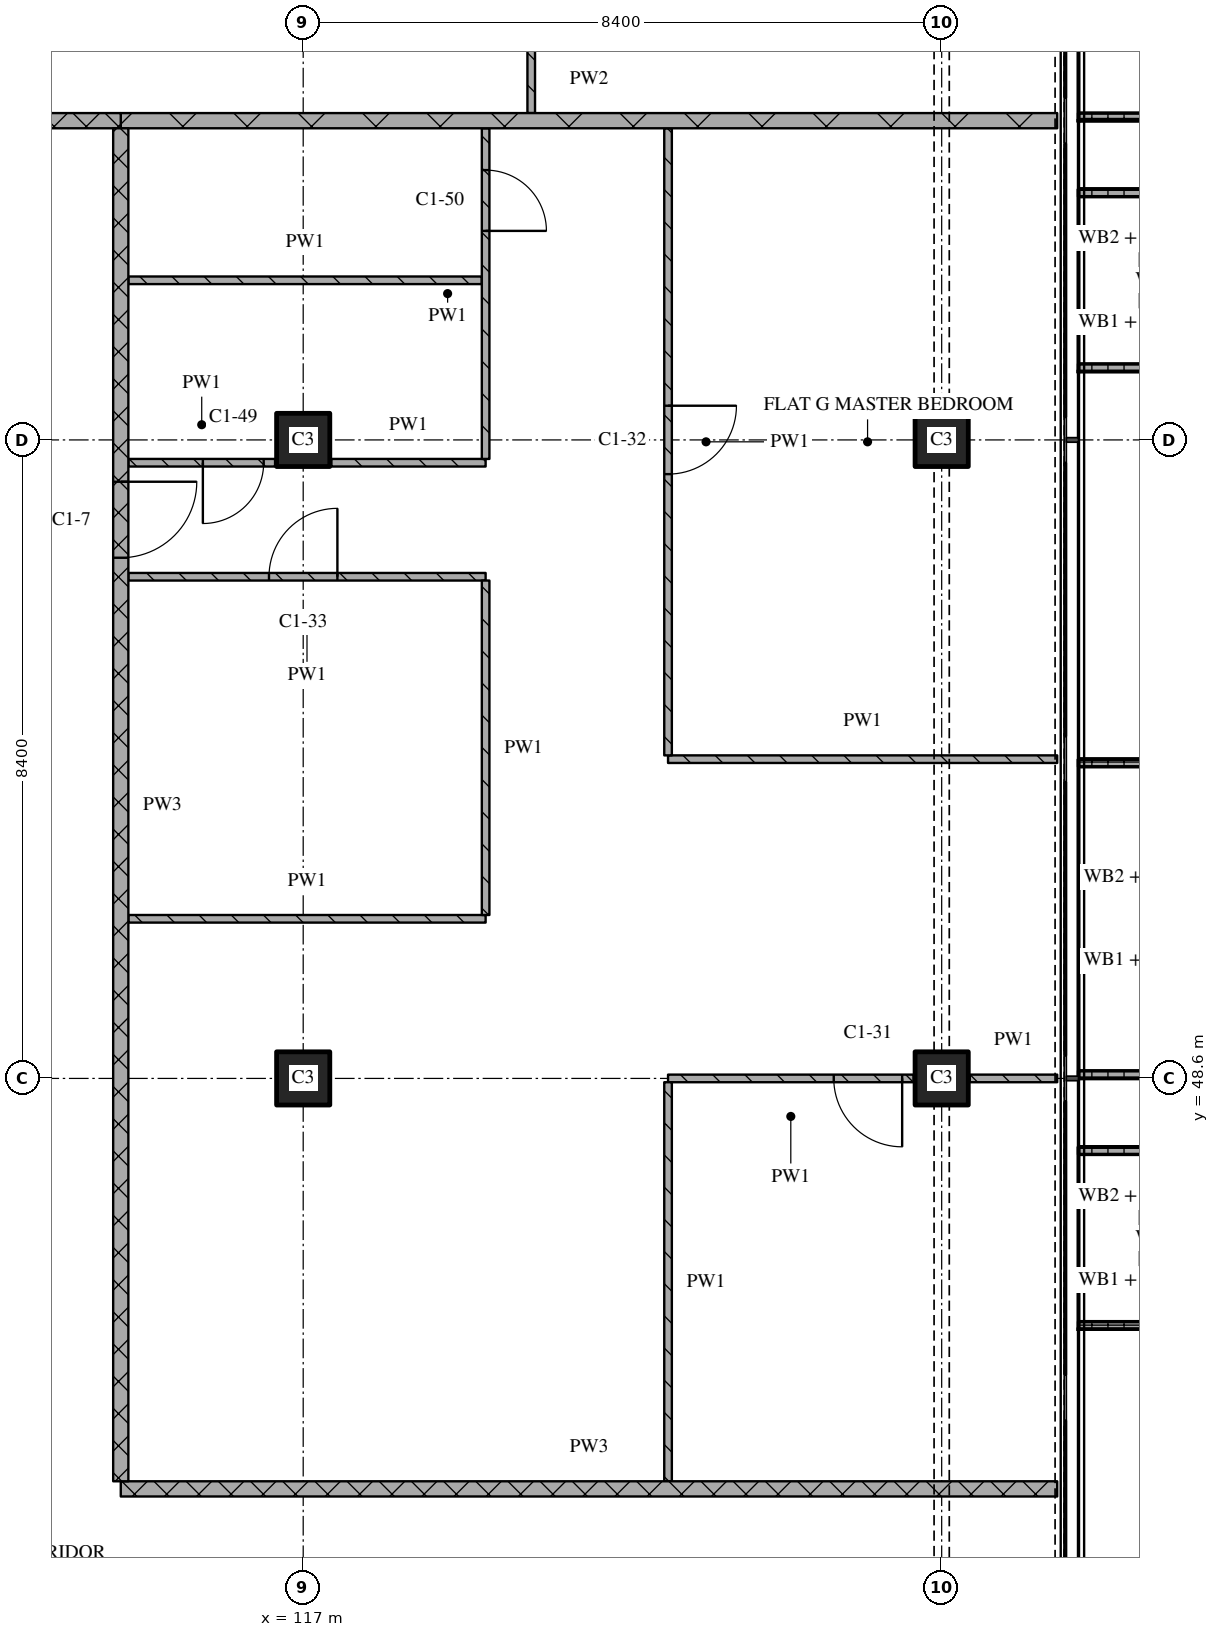
"""IFC4 building model, lengths in metres.
Left out: names, types, materials, properties, quantities, classifications, styles, units other than length and angle.
Written with IfcOpenShell. Run it as: python <this file> out.ifc"""

import sys

from ifc_helpers import new_model, si_unit, direction, frame, frame_2d, origin, origin_2d, place, context, subcontext, project, spatial, polyline, rectangle, outline, extrude, element, fill, save


model = new_model("IFC4")
c1 = context("Model", 3, precision=1e-05, world=origin(), true_north=direction((0.0, 1.0)))
c2 = subcontext(c1, "Body", "Model", "MODEL_VIEW")
j1 = project(units=[si_unit("LENGTHUNIT", "METRE"), si_unit("PLANEANGLEUNIT", "RADIAN")], contexts=[c1])
p1 = place(None, origin())
s1 = spatial("IfcSite", under=j1, at=p1, CompositionType="ELEMENT")
p2 = place(p1, origin())
s2 = spatial("IfcBuilding", under=s1, at=p2, CompositionType="ELEMENT")
p3 = place(p2, frame((0.0, 0.0, 154.65)))
s3 = spatial("IfcBuildingStorey", under=s2, at=p3, CompositionType="ELEMENT", Elevation=154.65)
for number, where, z_axis, x_axis in (
    (1, (117.0, 48.6, 0.0), (0.0, 0.0, 1.0), (1.0, 0.0, 0.0)),
    (2, (117.0, 57.0, 0.0), (0.0, 0.0, 1.0), (1.0, 0.0, 0.0)),
    (3, (125.4, 48.6, 0.0), (0.0, 0.0, 1.0), (1.0, 0.0, 0.0)),
    (4, (125.4, 57.0, 0.0), (0.0, 0.0, 1.0), (1.0, 0.0, 0.0)),
):
    element("IfcColumn", number, at=place(p3, frame(where, z_axis=z_axis, x_axis=x_axis)), inside=s3, PredefinedType="COLUMN", context=c2, shape_type="SweptSolid", body=[
        extrude(rectangle(XDim=0.7, YDim=0.7, at=origin_2d()), origin(), (0.0, 0.0, 1.0), 3.6),
    ])
p4 = place(p3, origin())
e5 = element("IfcWall", 5, at=p4, inside=s3, PredefinedType="SOLIDWALL", context=c2, shape_type="SweptSolid", body=[
    extrude(outline(polyline([(127.2, 45.3), (127.2, 45.4), (128.7, 45.4), (128.7, 47.6), (127.2, 47.6), (127.2, 47.7), (128.8, 47.7), (128.8, 45.3), (127.2, 45.3)])), origin(), (0.0, 0.0, 1.0), 1.0),
])
p5 = place(p3, origin())
e6 = element("IfcWall", 6, at=p5, inside=s3, PredefinedType="SOLIDWALL", context=c2, shape_type="SweptSolid", body=[
    extrude(outline(polyline([(127.2, 48.6), (127.2, 48.7), (128.833, 48.7), (128.833, 52.7), (127.2, 52.7), (127.2, 52.8), (128.933, 52.8), (128.933, 48.6), (127.2, 48.6)])), origin(), (0.0, 0.0, 1.0), 1.0),
])
p6 = place(p3, origin())
e7 = element("IfcWall", 7, at=p6, inside=s3, PredefinedType="SOLIDWALL", context=c2, shape_type="SweptSolid", body=[
    extrude(outline(polyline([(127.2, 57.9), (127.2, 58.0), (128.7, 58.0), (128.7, 60.2), (127.2, 60.2), (127.2, 60.3), (128.8, 60.3), (128.8, 57.9), (127.2, 57.9)])), origin(), (0.0, 0.0, 1.0), 1.0),
])
p7 = place(p3, origin())
e8 = element("IfcWall", 8, at=p7, inside=s3, PredefinedType="SOLIDWALL", context=c2, shape_type="SweptSolid", body=[
    extrude(outline(polyline([(127.2, 61.2), (127.2, 61.3), (128.833, 61.3), (128.833, 65.3), (127.2, 65.3), (127.2, 65.4), (128.933, 65.4), (128.933, 61.2), (127.2, 61.2)])), origin(), (0.0, 0.0, 1.0), 1.0),
])
p8 = place(p3, frame((114.6, 43.2, 0.0), z_axis=(0.0, 0.0, 1.0), x_axis=(1.0, 0.0, 0.0)))
e9 = element("IfcWall", 9, at=p8, inside=s3, PredefinedType="PARTITIONING", context=c2, shape_type="SweptSolid", body=[
    extrude(rectangle(XDim=12.32, YDim=0.2, at=frame_2d((6.16, 0.0))), origin(), (0.0, 0.0, 1.0), 3.32),
])
p9 = place(p3, frame((125.03, 48.6, 0.0), z_axis=(0.0, 0.0, 1.0), x_axis=(-1.0, 0.0, 0.0)))
e10 = element("IfcWall", 10, at=p9, inside=s3, PredefinedType="PARTITIONING", context=c2, shape_type="SweptSolid", body=[
    extrude(rectangle(XDim=3.23, YDim=0.1, at=frame_2d((1.615, 0.0))), origin(), (0.0, 0.0, 1.0), 3.32),
])
p10 = place(p9, frame((0.15, 0.0, 0.0)))
e11 = element("IfcOpeningElement", 11, at=p10, cuts=e10, PredefinedType="OPENING", context=c2, shape_type="SweptSolid", body=[
    extrude(rectangle(XDim=0.9, YDim=2.1, at=frame_2d((0.45, 1.05))), frame((0.0, 0.06, 0.0), z_axis=(0.0, -1.0, 0.0), x_axis=(1.0, 0.0, 0.0)), (0.0, 0.0, 1.0), 0.12),
])
p11 = place(p3, frame((125.77, 48.6, 0.0), z_axis=(0.0, 0.0, 1.0), x_axis=(1.0, 0.0, 0.0)))
e12 = element("IfcWall", 12, at=p11, inside=s3, PredefinedType="PARTITIONING", context=c2, shape_type="SweptSolid", body=[
    extrude(rectangle(XDim=1.15, YDim=0.1, at=frame_2d((0.575, 0.0))), origin(), (0.0, 0.0, 1.0), 3.32),
])
p12 = place(p3, frame((114.7, 50.7, 0.0), z_axis=(0.0, 0.0, 1.0), x_axis=(1.0, 0.0, 0.0)))
e13 = element("IfcWall", 13, at=p12, inside=s3, PredefinedType="PARTITIONING", context=c2, shape_type="SweptSolid", body=[
    extrude(rectangle(XDim=4.7, YDim=0.1, at=frame_2d((2.35, 0.0))), origin(), (0.0, 0.0, 1.0), 3.32),
])
p13 = place(p3, frame((121.8, 52.8, 0.0), z_axis=(0.0, 0.0, 1.0), x_axis=(1.0, 0.0, 0.0)))
e14 = element("IfcWall", 14, at=p13, inside=s3, PredefinedType="PARTITIONING", context=c2, shape_type="SweptSolid", body=[
    extrude(rectangle(XDim=5.12, YDim=0.1, at=frame_2d((2.56, 0.0))), origin(), (0.0, 0.0, 1.0), 3.32),
])
p14 = place(p3, frame((119.4, 55.2, 0.0), z_axis=(0.0, 0.0, 1.0), x_axis=(-1.0, 0.0, 0.0)))
e15 = element("IfcWall", 15, at=p14, inside=s3, PredefinedType="PARTITIONING", context=c2, shape_type="SweptSolid", body=[
    extrude(rectangle(XDim=4.7, YDim=0.1, at=frame_2d((2.35, 0.0))), origin(), (0.0, 0.0, 1.0), 3.32),
])
p15 = place(p14, frame((1.95, 0.0, 0.0)))
e16 = element("IfcOpeningElement", 16, at=p15, cuts=e15, PredefinedType="OPENING", context=c2, shape_type="SweptSolid", body=[
    extrude(rectangle(XDim=0.9, YDim=2.1, at=frame_2d((0.45, 1.05))), frame((0.0, 0.06, 0.0), z_axis=(0.0, -1.0, 0.0), x_axis=(1.0, 0.0, 0.0)), (0.0, 0.0, 1.0), 0.12),
])
p16 = place(p3, frame((114.7, 56.7, 0.0), z_axis=(0.0, 0.0, 1.0), x_axis=(1.0, 0.0, 0.0)))
e17 = element("IfcWall", 17, at=p16, inside=s3, PredefinedType="PARTITIONING", context=c2, shape_type="SweptSolid", body=[
    extrude(rectangle(XDim=1.93, YDim=0.1, at=frame_2d((0.965, 0.0))), origin(), (0.0, 0.0, 1.0), 3.32),
])
p17 = place(p16, frame((0.98, 0.0, 0.0)))
e18 = element("IfcOpeningElement", 18, at=p17, cuts=e17, PredefinedType="OPENING", context=c2, shape_type="SweptSolid", body=[
    extrude(rectangle(XDim=0.8, YDim=2.1, at=frame_2d((0.4, 1.05))), frame((0.0, 0.06, 0.0), z_axis=(0.0, -1.0, 0.0), x_axis=(1.0, 0.0, 0.0)), (0.0, 0.0, 1.0), 0.12),
])
p18 = place(p3, frame((117.37, 56.7, 0.0), z_axis=(0.0, 0.0, 1.0), x_axis=(1.0, 0.0, 0.0)))
e19 = element("IfcWall", 19, at=p18, inside=s3, PredefinedType="PARTITIONING", context=c2, shape_type="SweptSolid", body=[
    extrude(rectangle(XDim=2.03, YDim=0.1, at=frame_2d((1.015, 0.0))), origin(), (0.0, 0.0, 1.0), 3.32),
])
p19 = place(p3, frame((114.7, 59.1, 0.0), z_axis=(0.0, 0.0, 1.0), x_axis=(1.0, 0.0, 0.0)))
e20 = element("IfcWall", 20, at=p19, inside=s3, PredefinedType="PARTITIONING", context=c2, shape_type="SweptSolid", body=[
    extrude(rectangle(XDim=4.65, YDim=0.1, at=frame_2d((2.325, 0.0))), origin(), (0.0, 0.0, 1.0), 3.32),
])
p20 = place(p3, frame((111.0, 61.2, 0.0), z_axis=(0.0, 0.0, 1.0), x_axis=(1.0, 0.0, 0.0)))
e21 = element("IfcWall", 21, at=p20, inside=s3, PredefinedType="PARTITIONING", context=c2, shape_type="SweptSolid", body=[
    extrude(rectangle(XDim=3.6, YDim=0.2, at=frame_2d((1.8, 0.0))), origin(), (0.0, 0.0, 1.0), 3.32),
])
p21 = place(p3, frame((114.6, 61.2, 0.0), z_axis=(0.0, 0.0, 1.0), x_axis=(1.0, 0.0, 0.0)))
e22 = element("IfcWall", 22, at=p21, inside=s3, PredefinedType="PARTITIONING", context=c2, shape_type="SweptSolid", body=[
    extrude(rectangle(XDim=12.32, YDim=0.2, at=frame_2d((6.16, 0.0))), origin(), (0.0, 0.0, 1.0), 3.32),
])
p22 = place(p3, frame((114.6, 61.1, 0.0), z_axis=(0.0, 0.0, 1.0), x_axis=(0.0, -1.0, 0.0)))
e23 = element("IfcWall", 23, at=p22, inside=s3, PredefinedType="PARTITIONING", context=c2, shape_type="SweptSolid", body=[
    extrude(rectangle(XDim=17.8, YDim=0.2, at=frame_2d((8.9, 0.0))), origin(), (0.0, 0.0, 1.0), 3.32),
])
p23 = place(p22, frame((4.65, 0.0, 0.0)))
e24 = element("IfcOpeningElement", 24, at=p23, cuts=e23, PredefinedType="OPENING", context=c2, shape_type="SweptSolid", body=[
    extrude(rectangle(XDim=1.0, YDim=2.1, at=frame_2d((0.5, 1.05))), frame((0.0, 0.11, 0.0), z_axis=(0.0, -1.0, 0.0), x_axis=(1.0, 0.0, 0.0)), (0.0, 0.0, 1.0), 0.22),
])
p24 = place(p3, frame((119.4, 55.15, 0.0), z_axis=(0.0, 0.0, 1.0), x_axis=(0.0, -1.0, 0.0)))
e25 = element("IfcWall", 25, at=p24, inside=s3, PredefinedType="PARTITIONING", context=c2, shape_type="SweptSolid", body=[
    extrude(rectangle(XDim=4.4, YDim=0.1, at=frame_2d((2.2, 0.0))), origin(), (0.0, 0.0, 1.0), 3.32),
])
p25 = place(p3, frame((119.4, 56.75, 0.0), z_axis=(0.0, 0.0, 1.0), x_axis=(0.0, 1.0, 0.0)))
e26 = element("IfcWall", 26, at=p25, inside=s3, PredefinedType="PARTITIONING", context=c2, shape_type="SweptSolid", body=[
    extrude(rectangle(XDim=4.35, YDim=0.1, at=frame_2d((2.175, 0.0))), origin(), (0.0, 0.0, 1.0), 3.32),
])
p26 = place(p25, frame((3.0, 0.0, 0.0)))
e27 = element("IfcOpeningElement", 27, at=p26, cuts=e26, PredefinedType="OPENING", context=c2, shape_type="SweptSolid", body=[
    extrude(rectangle(XDim=0.8, YDim=2.1, at=frame_2d((0.4, 1.05))), frame((0.0, 0.06, 0.0), z_axis=(0.0, -1.0, 0.0), x_axis=(1.0, 0.0, 0.0)), (0.0, 0.0, 1.0), 0.12),
])
p27 = place(p3, frame((120.0, 65.35, 0.0), z_axis=(0.0, 0.0, 1.0), x_axis=(0.0, -1.0, 0.0)))
e28 = element("IfcWall", 28, at=p27, inside=s3, PredefinedType="PARTITIONING", context=c2, shape_type="SweptSolid", body=[
    extrude(rectangle(XDim=4.05, YDim=0.1, at=frame_2d((2.025, 0.0))), origin(), (0.0, 0.0, 1.0), 3.32),
])
p28 = place(p3, frame((121.8, 48.55, 0.0), z_axis=(0.0, 0.0, 1.0), x_axis=(0.0, -1.0, 0.0)))
e29 = element("IfcWall", 29, at=p28, inside=s3, PredefinedType="PARTITIONING", context=c2, shape_type="SweptSolid", body=[
    extrude(rectangle(XDim=5.25, YDim=0.1, at=frame_2d((2.625, 0.0))), origin(), (0.0, 0.0, 1.0), 3.32),
])
p29 = place(p3, frame((121.8, 61.1, 0.0), z_axis=(0.0, 0.0, 1.0), x_axis=(0.0, -1.0, 0.0)))
e30 = element("IfcWall", 30, at=p29, inside=s3, PredefinedType="PARTITIONING", context=c2, shape_type="SweptSolid", body=[
    extrude(rectangle(XDim=8.25, YDim=0.1, at=frame_2d((4.125, 0.0))), origin(), (0.0, 0.0, 1.0), 3.32),
])
p30 = place(p29, frame((3.65, 0.0, 0.0)))
e31 = element("IfcOpeningElement", 31, at=p30, cuts=e30, PredefinedType="OPENING", context=c2, shape_type="SweptSolid", body=[
    extrude(rectangle(XDim=0.9, YDim=2.1, at=frame_2d((0.45, 1.05))), frame((0.0, 0.06, 0.0), z_axis=(0.0, -1.0, 0.0), x_axis=(1.0, 0.0, 0.0)), (0.0, 0.0, 1.0), 0.12),
])
p31 = place(p10, origin())
e32 = element("IfcDoor", 32, at=p31, inside=s3, OperationType="SINGLE_SWING_LEFT", PredefinedType="DOOR", context=c2, shape_type="SweptSolid", body=[
    extrude(rectangle(XDim=0.9, YDim=2.1, at=frame_2d((0.45, 1.05))), frame((0.0, 0.025, 0.0), z_axis=(0.0, -1.0, 0.0), x_axis=(1.0, 0.0, 0.0)), (0.0, 0.0, 1.0), 0.05),
])
fill(e11, e32)
p32 = place(p15, origin())
e33 = element("IfcDoor", 33, at=p32, inside=s3, OperationType="SINGLE_SWING_RIGHT", PredefinedType="DOOR", context=c2, shape_type="SweptSolid", body=[
    extrude(rectangle(XDim=0.9, YDim=2.1, at=frame_2d((0.45, 1.05))), frame((0.0, 0.025, 0.0), z_axis=(0.0, -1.0, 0.0), x_axis=(1.0, 0.0, 0.0)), (0.0, 0.0, 1.0), 0.05),
])
fill(e16, e33)
p33 = place(p17, origin())
e34 = element("IfcDoor", 34, at=p33, inside=s3, OperationType="SINGLE_SWING_RIGHT", PredefinedType="DOOR", context=c2, shape_type="SweptSolid", body=[
    extrude(rectangle(XDim=0.8, YDim=2.1, at=frame_2d((0.4, 1.05))), frame((0.0, 0.025, 0.0), z_axis=(0.0, -1.0, 0.0), x_axis=(1.0, 0.0, 0.0)), (0.0, 0.0, 1.0), 0.05),
])
fill(e18, e34)
p34 = place(p23, origin())
e35 = element("IfcDoor", 35, at=p34, inside=s3, OperationType="SINGLE_SWING_LEFT", PredefinedType="DOOR", context=c2, shape_type="SweptSolid", body=[
    extrude(rectangle(XDim=1.0, YDim=2.1, at=frame_2d((0.5, 1.05))), frame((0.0, 0.025, 0.0), z_axis=(0.0, -1.0, 0.0), x_axis=(1.0, 0.0, 0.0)), (0.0, 0.0, 1.0), 0.05),
])
fill(e24, e35)
p35 = place(p26, origin())
e36 = element("IfcDoor", 36, at=p35, inside=s3, OperationType="SINGLE_SWING_RIGHT", PredefinedType="DOOR", context=c2, shape_type="SweptSolid", body=[
    extrude(rectangle(XDim=0.8, YDim=2.1, at=frame_2d((0.4, 1.05))), frame((0.0, 0.025, 0.0), z_axis=(0.0, -1.0, 0.0), x_axis=(1.0, 0.0, 0.0)), (0.0, 0.0, 1.0), 0.05),
])
fill(e27, e36)
p36 = place(p30, origin())
e37 = element("IfcDoor", 37, at=p36, inside=s3, OperationType="SINGLE_SWING_LEFT", PredefinedType="DOOR", context=c2, shape_type="SweptSolid", body=[
    extrude(rectangle(XDim=0.9, YDim=2.1, at=frame_2d((0.45, 1.05))), frame((0.0, 0.025, 0.0), z_axis=(0.0, -1.0, 0.0), x_axis=(1.0, 0.0, 0.0)), (0.0, 0.0, 1.0), 0.05),
])
fill(e31, e37)
save(model, sys.argv[1])
